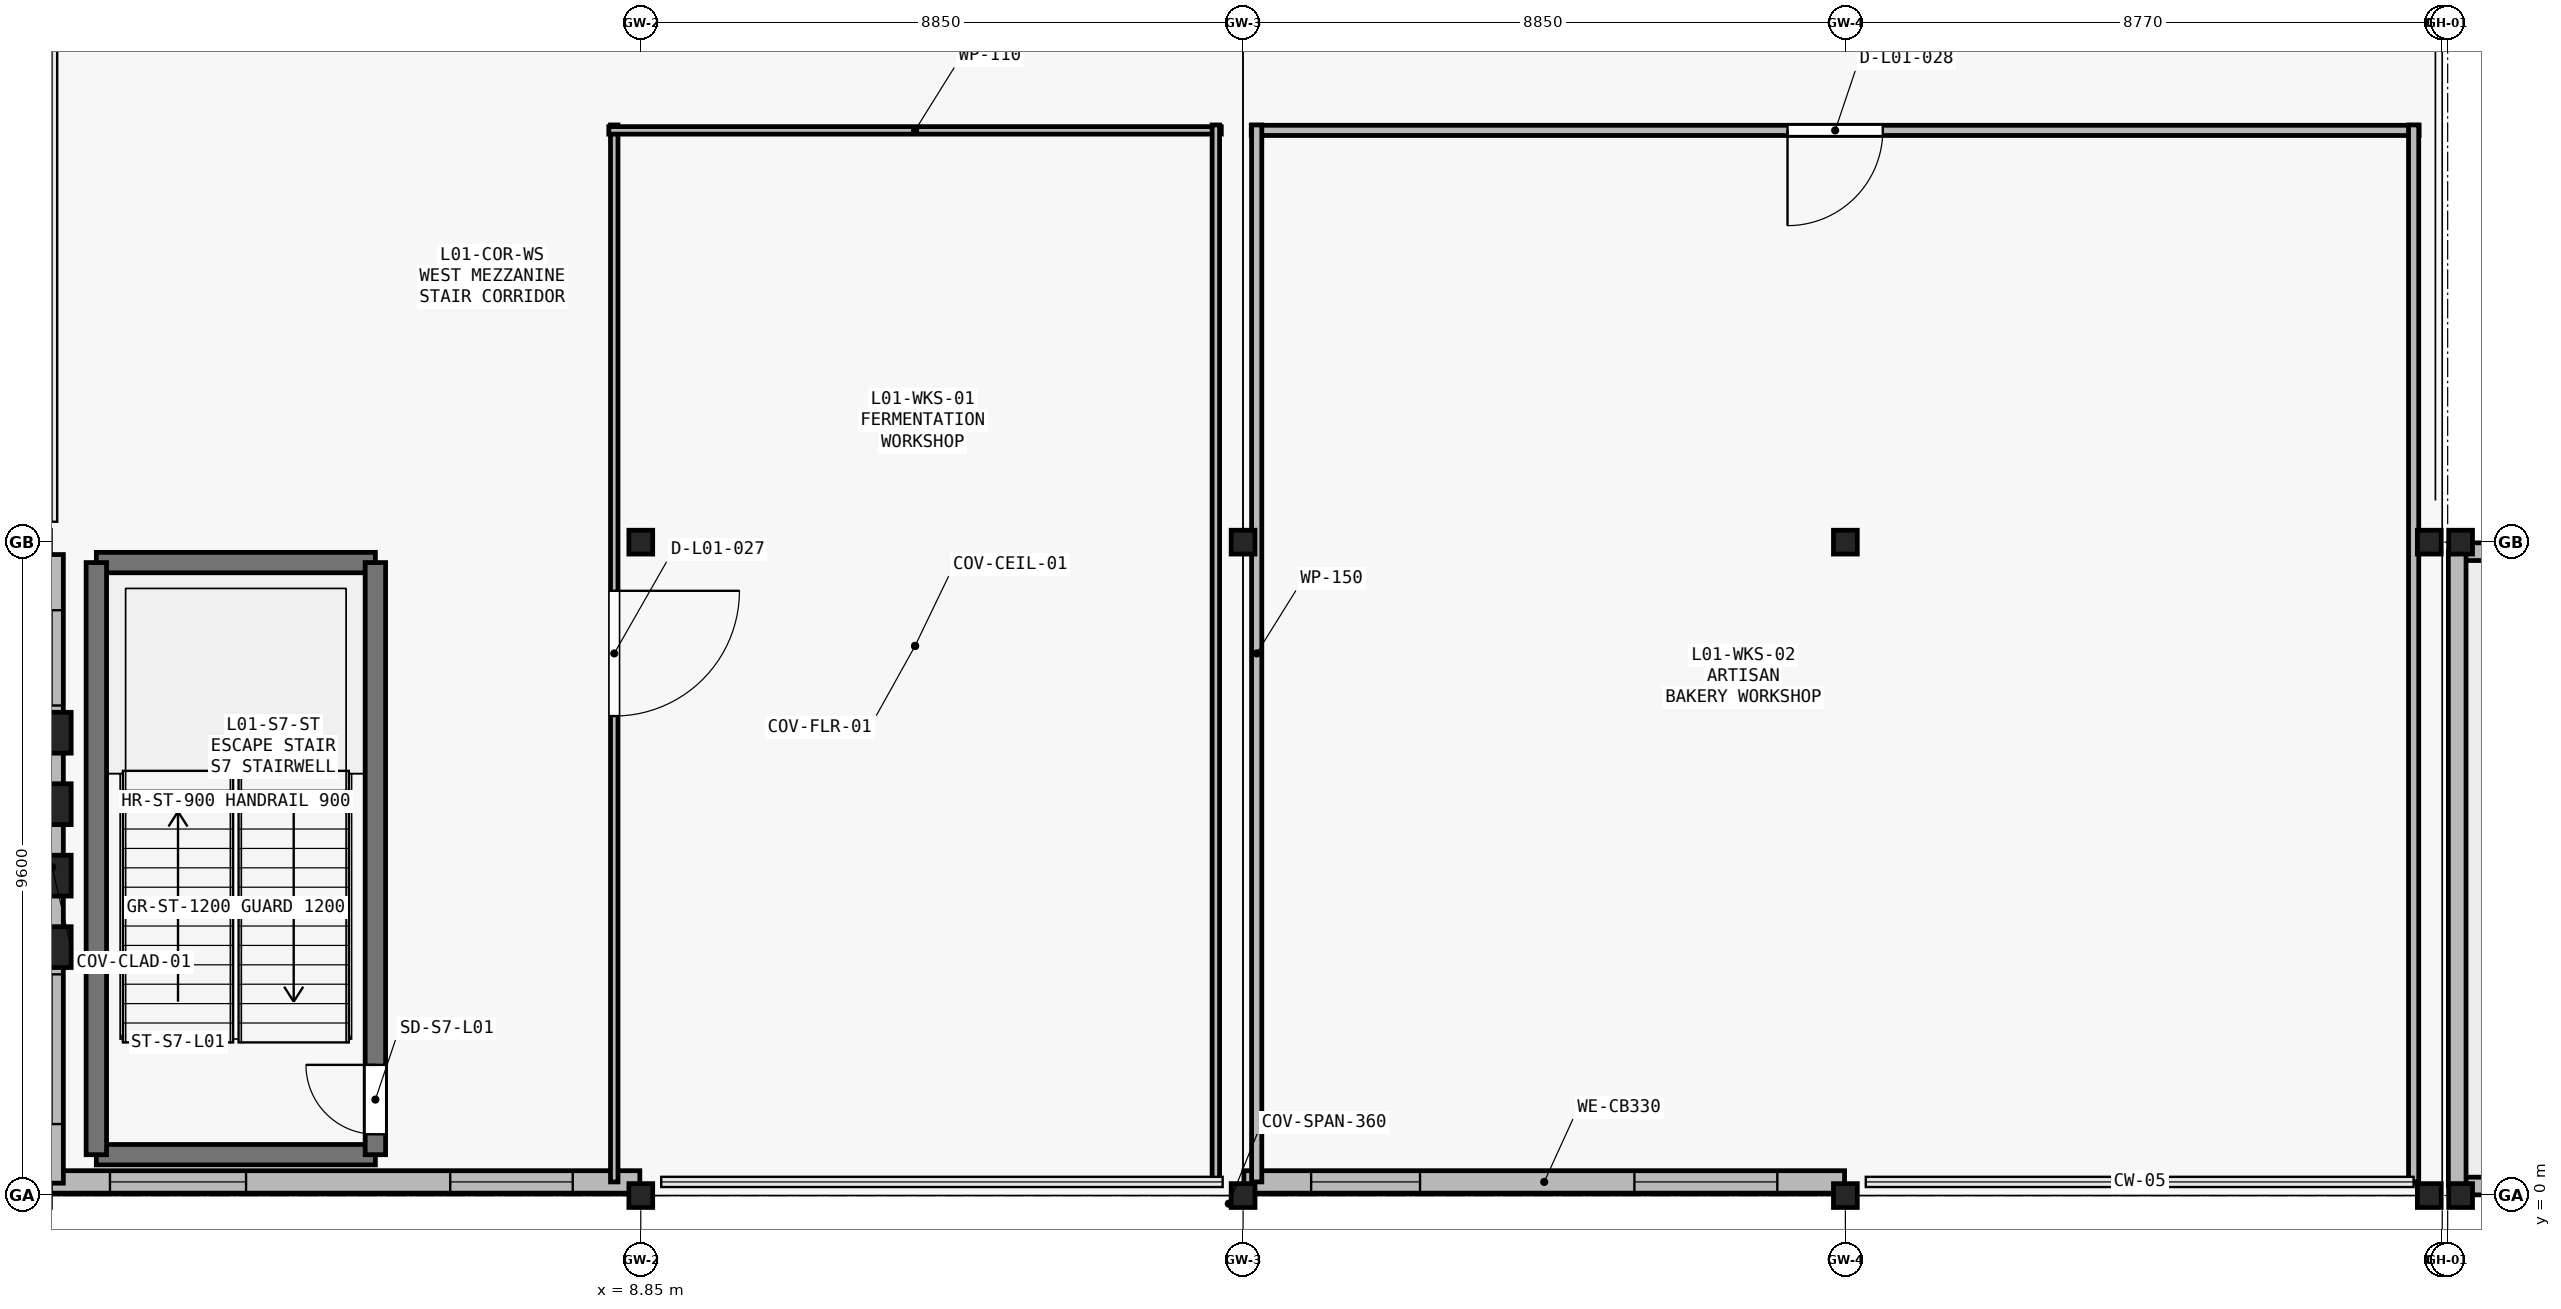
"""IFC4 building model, lengths in metres.
Left out: names, types, materials, properties, quantities, classifications, styles, units other than length and angle.
Written with IfcOpenShell. Run it as: python <this file> out.ifc"""

import sys

from ifc_helpers import new_model, si_unit, direction, frame, frame_2d, origin, origin_2d, place, context, subcontext, project, spatial, rectangle, i_section, extrude, element, fill, save


model = new_model("IFC4")
c1 = context("Model", 3, precision=1e-05, world=origin(), true_north=direction((0.0, 1.0)))
c2 = subcontext(c1, "Body", "Model", "MODEL_VIEW")
j1 = project(units=[si_unit("LENGTHUNIT", "METRE"), si_unit("PLANEANGLEUNIT", "RADIAN")], contexts=[c1])
p1 = place(None, origin())
s1 = spatial("IfcSite", under=j1, at=p1, CompositionType="ELEMENT")
p2 = place(p1, origin())
s2 = spatial("IfcBuilding", under=s1, at=p2, CompositionType="ELEMENT")
p3 = place(p2, frame((0.0, 0.0, 6.0)))
s3 = spatial("IfcBuildingStorey", under=s2, at=p3, CompositionType="ELEMENT", Elevation=6.0)
for number, where, z_axis, x_axis in (
    (1, (8.85, 0.0, 0.0), (0.0, 0.0, 1.0), (1.0, 0.0, 0.0)),
    (2, (8.85, 9.6, 0.0), (0.0, 0.0, 1.0), (1.0, 0.0, 0.0)),
    (3, (17.7, 0.0, 0.0), (0.0, 0.0, 1.0), (1.0, 0.0, 0.0)),
    (4, (17.7, 9.6, 0.0), (0.0, 0.0, 1.0), (1.0, 0.0, 0.0)),
    (5, (26.55, 0.0, 0.0), (0.0, 0.0, 1.0), (1.0, 0.0, 0.0)),
    (6, (26.55, 9.6, 0.0), (0.0, 0.0, 1.0), (1.0, 0.0, 0.0)),
    (7, (35.13, 0.0, 0.0), (0.0, 0.0, 1.0), (1.0, 0.0, 0.0)),
    (8, (35.13, 9.6, 0.0), (0.0, 0.0, 1.0), (1.0, 0.0, 0.0)),
    (9, (35.59, 0.0, 0.0), (0.0, 0.0, 1.0), (1.0, 0.0, 0.0)),
    (10, (35.59, 9.6, 0.0), (0.0, 0.0, 1.0), (1.0, 0.0, 0.0)),
):
    element("IfcColumn", number, at=place(p3, frame(where, z_axis=z_axis, x_axis=x_axis)), inside=s3, PredefinedType="COLUMN", context=c2, shape_type="SweptSolid", body=[
        extrude(i_section(OverallWidth=0.35, OverallDepth=0.35, WebThickness=0.012, FlangeThickness=0.019, FilletRadius=0.02, at=origin_2d()), origin(), (0.0, 0.0, 1.0), 4.8),
    ])
for number, where, z_axis, x_axis in (
    (11, (0.18, 3.65, 0.0), (0.0, 0.0, 1.0), (1.0, 0.0, 0.0)),
    (12, (0.18, 4.7, 0.0), (0.0, 0.0, 1.0), (1.0, 0.0, 0.0)),
    (13, (0.18, 5.75, 0.0), (0.0, 0.0, 1.0), (1.0, 0.0, 0.0)),
    (14, (0.18, 6.8, 0.0), (0.0, 0.0, 1.0), (1.0, 0.0, 0.0)),
):
    element("IfcColumn", number, at=place(p3, frame(where, z_axis=z_axis, x_axis=x_axis)), inside=s3, PredefinedType="PILASTER", context=c2, shape_type="SweptSolid", body=[
        extrude(rectangle(XDim=0.6, YDim=0.6, at=origin_2d()), origin(), (0.0, 0.0, 1.0), 4.55),
    ])
p4 = place(p3, frame((26.538, 0.2, 0.0), z_axis=(0.0, 0.0, 1.0), x_axis=(-1.0, 0.0, 0.0)))
e15 = element("IfcWall", 15, at=p4, inside=s3, PredefinedType="SOLIDWALL", context=c2, shape_type="SweptSolid", body=[
    extrude(rectangle(XDim=8.826, YDim=0.33, at=frame_2d((4.413, 0.0))), origin(), (0.0, 0.0, 1.0), 3.95),
])
p5 = place(p4, frame((0.988, 0.0, 0.95)))
e16 = element("IfcOpeningElement", 16, at=p5, cuts=e15, PredefinedType="OPENING", context=c2, shape_type="SweptSolid", body=[
    extrude(rectangle(XDim=2.1, YDim=1.8, at=frame_2d((1.05, 0.9))), frame((0.0, 0.175, 0.0), z_axis=(0.0, -1.0, 0.0), x_axis=(1.0, 0.0, 0.0)), (0.0, 0.0, 1.0), 0.35),
])
p6 = place(p4, frame((6.238, 0.0, 0.95)))
e17 = element("IfcOpeningElement", 17, at=p6, cuts=e15, PredefinedType="OPENING", context=c2, shape_type="SweptSolid", body=[
    extrude(rectangle(XDim=1.6, YDim=2.1, at=frame_2d((0.8, 1.05))), frame((0.0, 0.175, 0.0), z_axis=(0.0, -1.0, 0.0), x_axis=(1.0, 0.0, 0.0)), (0.0, 0.0, 1.0), 0.35),
])
p7 = place(p3, frame((8.836, 0.2, 0.0), z_axis=(0.0, 0.0, 1.0), x_axis=(-1.0, 0.0, 0.0)))
e18 = element("IfcWall", 18, at=p7, inside=s3, PredefinedType="SOLIDWALL", context=c2, shape_type="SweptSolid", body=[
    extrude(rectangle(XDim=8.822, YDim=0.33, at=frame_2d((4.411, 0.0))), origin(), (0.0, 0.0, 1.0), 3.95),
])
p8 = place(p7, frame((0.986, 0.0, 0.95)))
e19 = element("IfcOpeningElement", 19, at=p8, cuts=e18, PredefinedType="OPENING", context=c2, shape_type="SweptSolid", body=[
    extrude(rectangle(XDim=1.8, YDim=2.1, at=frame_2d((0.9, 1.05))), frame((0.0, 0.175, 0.0), z_axis=(0.0, -1.0, 0.0), x_axis=(1.0, 0.0, 0.0)), (0.0, 0.0, 1.0), 0.35),
])
p9 = place(p7, frame((5.786, 0.0, 0.95)))
e20 = element("IfcOpeningElement", 20, at=p9, cuts=e18, PredefinedType="OPENING", context=c2, shape_type="SweptSolid", body=[
    extrude(rectangle(XDim=2.0, YDim=2.1, at=frame_2d((1.0, 1.05))), frame((0.0, 0.175, 0.0), z_axis=(0.0, -1.0, 0.0), x_axis=(1.0, 0.0, 0.0)), (0.0, 0.0, 1.0), 0.35),
])
p10 = place(p3, frame((0.2, 0.182, 0.0), z_axis=(0.0, 0.0, 1.0), x_axis=(0.0, 1.0, 0.0)))
e21 = element("IfcWall", 21, at=p10, inside=s3, PredefinedType="SOLIDWALL", context=c2, shape_type="SweptSolid", body=[
    extrude(rectangle(XDim=9.236, YDim=0.33, at=frame_2d((4.618, 0.0))), origin(), (0.0, 0.0, 1.0), 3.95),
])
p11 = place(p10, frame((0.868, 0.0, 0.95)))
e22 = element("IfcOpeningElement", 22, at=p11, cuts=e21, PredefinedType="OPENING", context=c2, shape_type="SweptSolid", body=[
    extrude(rectangle(XDim=2.2, YDim=2.1, at=frame_2d((1.1, 1.05))), frame((0.0, 0.175, 0.0), z_axis=(0.0, -1.0, 0.0), x_axis=(1.0, 0.0, 0.0)), (0.0, 0.0, 1.0), 0.35),
])
p12 = place(p10, frame((7.018, 0.0, 0.95)))
e23 = element("IfcOpeningElement", 23, at=p12, cuts=e21, PredefinedType="OPENING", context=c2, shape_type="SweptSolid", body=[
    extrude(rectangle(XDim=1.4, YDim=2.4, at=frame_2d((0.7, 1.2))), frame((0.0, 0.175, 0.0), z_axis=(0.0, -1.0, 0.0), x_axis=(1.0, 0.0, 0.0)), (0.0, 0.0, 1.0), 0.35),
])
for number, where, z_axis, x_axis in (
    (24, (35.54, 0.14, 0.01), (0.0, 0.0, 1.0), (1.0, 0.0, 0.0)),
    (25, (64.06, 9.46, 0.01), (0.0, 0.0, 1.0), (-1.0, 0.0, 0.0)),
):
    element("IfcWall", number, at=place(p3, frame(where, z_axis=z_axis, x_axis=x_axis)), inside=s3, PredefinedType="PARAPET", context=c2, shape_type="SweptSolid", body=[
        extrude(rectangle(XDim=28.52, YDim=0.26, at=frame_2d((14.26, 0.0))), origin(), (0.0, 0.0, 1.0), 1.15),
    ])
p13 = place(p3, frame((35.54, 9.46, 0.01), z_axis=(0.0, 0.0, 1.0), x_axis=(0.0, -1.0, 0.0)))
e26 = element("IfcWall", 26, at=p13, inside=s3, PredefinedType="PARAPET", context=c2, shape_type="SweptSolid", body=[
    extrude(rectangle(XDim=9.32, YDim=0.26, at=frame_2d((4.66, 0.0))), origin(), (0.0, 0.0, 1.0), 1.15),
])
for number, where, z_axis, x_axis in (
    (27, (0.85, 0.6, 0.0), (0.0, 0.0, 1.0), (1.0, 0.0, 0.0)),
    (28, (4.95, 9.3, 0.0), (0.0, 0.0, 1.0), (-1.0, 0.0, 0.0)),
):
    element("IfcWall", number, at=place(p3, frame(where, z_axis=z_axis, x_axis=x_axis)), inside=s3, PredefinedType="SHEAR", context=c2, shape_type="SweptSolid", body=[
        extrude(rectangle(XDim=4.1, YDim=0.3, at=frame_2d((2.05, 0.0))), origin(), (0.0, 0.0, 1.0), 4.8),
    ])
p14 = place(p3, frame((0.85, 9.3, 0.0), z_axis=(0.0, 0.0, 1.0), x_axis=(0.0, -1.0, 0.0)))
e29 = element("IfcWall", 29, at=p14, inside=s3, PredefinedType="SHEAR", context=c2, shape_type="SweptSolid", body=[
    extrude(rectangle(XDim=8.7, YDim=0.3, at=frame_2d((4.35, 0.0))), origin(), (0.0, 0.0, 1.0), 4.8),
])
p15 = place(p3, frame((4.95, 0.6, 0.0), z_axis=(0.0, 0.0, 1.0), x_axis=(0.0, 1.0, 0.0)))
e30 = element("IfcWall", 30, at=p15, inside=s3, PredefinedType="SHEAR", context=c2, shape_type="SweptSolid", body=[
    extrude(rectangle(XDim=8.7, YDim=0.3, at=frame_2d((4.35, 0.0))), origin(), (0.0, 0.0, 1.0), 4.8),
])
p16 = place(p15, frame((0.3, 0.0, 0.0)))
e31 = element("IfcOpeningElement", 31, at=p16, cuts=e30, PredefinedType="OPENING", context=c2, shape_type="SweptSolid", body=[
    extrude(rectangle(XDim=1.02, YDim=2.1, at=frame_2d((0.51, 1.05))), frame((0.0, 0.16, 0.0), z_axis=(0.0, -1.0, 0.0), x_axis=(1.0, 0.0, 0.0)), (0.0, 0.0, 1.0), 0.32),
])
p17 = place(p3, frame((8.46, 15.73, 0.0), z_axis=(0.0, 0.0, 1.0), x_axis=(0.0, -1.0, 0.0)))
e32 = element("IfcWall", 32, at=p17, inside=s3, PredefinedType="PARTITIONING", context=c2, shape_type="SweptSolid", body=[
    extrude(rectangle(XDim=15.53, YDim=0.11, at=frame_2d((7.765, 0.0))), origin(), (0.0, 0.0, 1.0), 4.32),
])
p18 = place(p17, frame((6.845, 0.0, 0.0)))
e33 = element("IfcOpeningElement", 33, at=p18, cuts=e32, PredefinedType="OPENING", context=c2, shape_type="SweptSolid", body=[
    extrude(rectangle(XDim=1.84, YDim=2.2, at=frame_2d((0.92, 1.1))), frame((0.0, 0.065, 0.0), z_axis=(0.0, -1.0, 0.0), x_axis=(1.0, 0.0, 0.0)), (0.0, 0.0, 1.0), 0.13),
])
p19 = place(p3, frame((17.38, 15.65, 0.0), z_axis=(0.0, 0.0, 1.0), x_axis=(-1.0, 0.0, 0.0)))
e34 = element("IfcWall", 34, at=p19, inside=s3, PredefinedType="PARTITIONING", context=c2, shape_type="SweptSolid", body=[
    extrude(rectangle(XDim=9.0, YDim=0.11, at=frame_2d((4.5, 0.0))), origin(), (0.0, 0.0, 1.0), 4.32),
])
p20 = place(p3, frame((17.3, 0.2, 0.0), z_axis=(0.0, 0.0, 1.0), x_axis=(0.0, 1.0, 0.0)))
e35 = element("IfcWall", 35, at=p20, inside=s3, PredefinedType="PARTITIONING", context=c2, shape_type="SweptSolid", body=[
    extrude(rectangle(XDim=15.53, YDim=0.11, at=frame_2d((7.765, 0.0))), origin(), (0.0, 0.0, 1.0), 4.32),
])
p21 = place(p3, frame((34.98, 15.65, 0.0), z_axis=(0.0, 0.0, 1.0), x_axis=(-1.0, 0.0, 0.0)))
e36 = element("IfcWall", 36, at=p21, inside=s3, PredefinedType="PARTITIONING", context=c2, shape_type="SweptSolid", body=[
    extrude(rectangle(XDim=17.16, YDim=0.15, at=frame_2d((8.58, 0.0))), origin(), (0.0, 0.0, 1.0), 4.32),
])
p22 = place(p21, frame((7.88, 0.0, 0.0)))
e37 = element("IfcOpeningElement", 37, at=p22, cuts=e36, PredefinedType="OPENING", context=c2, shape_type="SweptSolid", body=[
    extrude(rectangle(XDim=1.4, YDim=2.38, at=frame_2d((0.7, 1.19))), frame((0.0, 0.085, 0.0), z_axis=(0.0, -1.0, 0.0), x_axis=(1.0, 0.0, 0.0)), (0.0, 0.0, 1.0), 0.17),
])
for number, where, z_axis, x_axis in (
    (38, (17.9, 15.73, 0.0), (0.0, 0.0, 1.0), (0.0, -1.0, 0.0)),
    (39, (34.9, 0.2, 0.0), (0.0, 0.0, 1.0), (0.0, 1.0, 0.0)),
):
    element("IfcWall", number, at=place(p3, frame(where, z_axis=z_axis, x_axis=x_axis)), inside=s3, PredefinedType="PARTITIONING", context=c2, shape_type="SweptSolid", body=[
        extrude(rectangle(XDim=15.53, YDim=0.15, at=frame_2d((7.765, 0.0))), origin(), (0.0, 0.0, 1.0), 4.015),
    ])
p23 = place(p5, origin())
e40 = element("IfcWindow", 40, at=p23, inside=s3, PartitioningType="SINGLE_PANEL", PredefinedType="WINDOW", context=c2, shape_type="SweptSolid", body=[
    extrude(rectangle(XDim=2.1, YDim=1.8, at=frame_2d((1.05, 0.9))), frame((0.0, 0.03, 0.0), z_axis=(0.0, -1.0, 0.0), x_axis=(1.0, 0.0, 0.0)), (0.0, 0.0, 1.0), 0.06),
])
fill(e16, e40)
p24 = place(p6, origin())
e41 = element("IfcWindow", 41, at=p24, inside=s3, PartitioningType="SINGLE_PANEL", PredefinedType="WINDOW", context=c2, shape_type="SweptSolid", body=[
    extrude(rectangle(XDim=1.6, YDim=2.1, at=frame_2d((0.8, 1.05))), frame((0.0, 0.03, 0.0), z_axis=(0.0, -1.0, 0.0), x_axis=(1.0, 0.0, 0.0)), (0.0, 0.0, 1.0), 0.06),
])
fill(e17, e41)
p25 = place(p8, origin())
e42 = element("IfcWindow", 42, at=p25, inside=s3, PartitioningType="SINGLE_PANEL", PredefinedType="WINDOW", context=c2, shape_type="SweptSolid", body=[
    extrude(rectangle(XDim=1.8, YDim=2.1, at=frame_2d((0.9, 1.05))), frame((0.0, 0.03, 0.0), z_axis=(0.0, -1.0, 0.0), x_axis=(1.0, 0.0, 0.0)), (0.0, 0.0, 1.0), 0.06),
])
fill(e19, e42)
p26 = place(p9, origin())
e43 = element("IfcWindow", 43, at=p26, inside=s3, PartitioningType="SINGLE_PANEL", PredefinedType="WINDOW", context=c2, shape_type="SweptSolid", body=[
    extrude(rectangle(XDim=2.0, YDim=2.1, at=frame_2d((1.0, 1.05))), frame((0.0, 0.03, 0.0), z_axis=(0.0, -1.0, 0.0), x_axis=(1.0, 0.0, 0.0)), (0.0, 0.0, 1.0), 0.06),
])
fill(e20, e43)
p27 = place(p11, origin())
e44 = element("IfcWindow", 44, at=p27, inside=s3, PartitioningType="SINGLE_PANEL", PredefinedType="WINDOW", context=c2, shape_type="SweptSolid", body=[
    extrude(rectangle(XDim=2.2, YDim=2.1, at=frame_2d((1.1, 1.05))), frame((0.0, 0.03, 0.0), z_axis=(0.0, -1.0, 0.0), x_axis=(1.0, 0.0, 0.0)), (0.0, 0.0, 1.0), 0.06),
])
fill(e22, e44)
p28 = place(p12, origin())
e45 = element("IfcWindow", 45, at=p28, inside=s3, PartitioningType="SINGLE_PANEL", PredefinedType="WINDOW", context=c2, shape_type="SweptSolid", body=[
    extrude(rectangle(XDim=1.4, YDim=2.4, at=frame_2d((0.7, 1.2))), frame((0.0, 0.03, 0.0), z_axis=(0.0, -1.0, 0.0), x_axis=(1.0, 0.0, 0.0)), (0.0, 0.0, 1.0), 0.06),
])
fill(e23, e45)
p29 = place(p16, origin())
e46 = element("IfcDoor", 46, at=p29, inside=s3, OperationType="SINGLE_SWING_RIGHT", PredefinedType="DOOR", context=c2, shape_type="SweptSolid", body=[
    extrude(rectangle(XDim=1.02, YDim=2.1, at=frame_2d((0.51, 1.05))), frame((0.0, 0.025, 0.0), z_axis=(0.0, -1.0, 0.0), x_axis=(1.0, 0.0, 0.0)), (0.0, 0.0, 1.0), 0.05),
])
fill(e31, e46)
p30 = place(p18, origin())
e47 = element("IfcDoor", 47, at=p30, inside=s3, OperationType="SINGLE_SWING_LEFT", PredefinedType="DOOR", context=c2, shape_type="SweptSolid", body=[
    extrude(rectangle(XDim=1.84, YDim=2.2, at=frame_2d((0.92, 1.1))), frame((0.0, 0.025, 0.0), z_axis=(0.0, -1.0, 0.0), x_axis=(1.0, 0.0, 0.0)), (0.0, 0.0, 1.0), 0.05),
])
fill(e33, e47)
p31 = place(p22, origin())
e48 = element("IfcDoor", 48, at=p31, inside=s3, OperationType="SINGLE_SWING_RIGHT", PredefinedType="DOOR", context=c2, shape_type="SweptSolid", body=[
    extrude(rectangle(XDim=1.4, YDim=2.38, at=frame_2d((0.7, 1.19))), frame((0.0, 0.025, 0.0), z_axis=(0.0, -1.0, 0.0), x_axis=(1.0, 0.0, 0.0)), (0.0, 0.0, 1.0), 0.05),
])
fill(e37, e48)
save(model, sys.argv[1])
